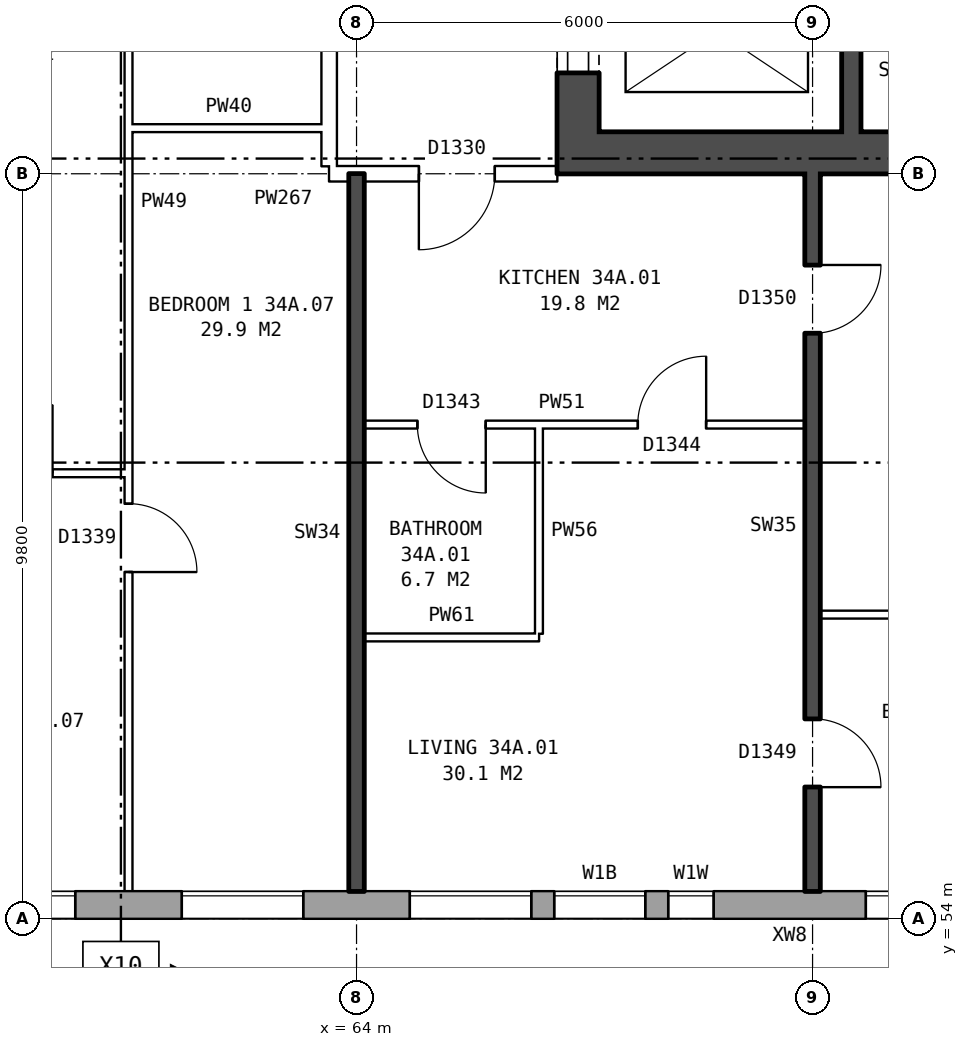
"""IFC4 building model, lengths in metres.
Left out: names, types, materials, properties, quantities, classifications, styles, units other than length and angle.
Written with IfcOpenShell. Run it as: python <this file> out.ifc"""

import sys

from ifc_helpers import new_model, si_unit, direction, frame, frame_2d, origin, place, context, subcontext, project, spatial, rectangle, extrude, element, fill, save


model = new_model("IFC4")
c1 = context("Model", 3, precision=1e-05, world=origin(), true_north=direction((0.0, 1.0)))
c2 = subcontext(c1, "Body", "Model", "MODEL_VIEW")
j1 = project(units=[si_unit("LENGTHUNIT", "METRE"), si_unit("PLANEANGLEUNIT", "RADIAN")], contexts=[c1])
p1 = place(None, origin())
s1 = spatial("IfcSite", under=j1, at=p1, CompositionType="ELEMENT")
p2 = place(p1, origin())
s2 = spatial("IfcBuilding", under=s1, at=p2, CompositionType="ELEMENT")
p3 = place(p2, frame((0.0, 0.0, 123.7)))
s3 = spatial("IfcBuildingStorey", under=s2, at=p3, CompositionType="ELEMENT", Elevation=123.7)
p4 = place(p3, frame((29.825, 54.18, 0.0), z_axis=(0.0, 0.0, 1.0), x_axis=(1.0, 0.0, 0.0)))
e1 = element("IfcWall", 1, at=p4, inside=s3, PredefinedType="STANDARD", context=c2, shape_type="SweptSolid", body=[
    extrude(rectangle(XDim=43.101, YDim=0.36, at=frame_2d((21.55, 0.0))), origin(), (0.0, 0.0, 1.0), 2.85),
])
p5 = place(p4, frame((0.3, 0.0, 0.8)))
e2 = element("IfcOpeningElement", 2, at=p5, cuts=e1, PredefinedType="OPENING", context=c2, shape_type="SweptSolid", body=[
    extrude(rectangle(XDim=1.6, YDim=1.8, at=frame_2d((0.8, 0.9))), frame((0.0, 0.19, 0.0), z_axis=(0.0, -1.0, 0.0), x_axis=(1.0, 0.0, 0.0)), (0.0, 0.0, 1.0), 0.38),
])
p6 = place(p4, frame((4.875, 0.0, 0.8)))
e3 = element("IfcOpeningElement", 3, at=p6, cuts=e1, PredefinedType="OPENING", context=c2, shape_type="SweptSolid", body=[
    extrude(rectangle(XDim=1.6, YDim=1.8, at=frame_2d((0.8, 0.9))), frame((0.0, 0.19, 0.0), z_axis=(0.0, -1.0, 0.0), x_axis=(1.0, 0.0, 0.0)), (0.0, 0.0, 1.0), 0.38),
])
p7 = place(p4, frame((7.875, 0.0, 0.8)))
e4 = element("IfcOpeningElement", 4, at=p7, cuts=e1, PredefinedType="OPENING", context=c2, shape_type="SweptSolid", body=[
    extrude(rectangle(XDim=1.6, YDim=1.8, at=frame_2d((0.8, 0.9))), frame((0.0, 0.19, 0.0), z_axis=(0.0, -1.0, 0.0), x_axis=(1.0, 0.0, 0.0)), (0.0, 0.0, 1.0), 0.38),
])
p8 = place(p4, frame((10.875, 0.0, 0.8)))
e5 = element("IfcOpeningElement", 5, at=p8, cuts=e1, PredefinedType="OPENING", context=c2, shape_type="SweptSolid", body=[
    extrude(rectangle(XDim=1.6, YDim=1.8, at=frame_2d((0.8, 0.9))), frame((0.0, 0.19, 0.0), z_axis=(0.0, -1.0, 0.0), x_axis=(1.0, 0.0, 0.0)), (0.0, 0.0, 1.0), 0.38),
])
p9 = place(p4, frame((13.875, 0.0, 0.8)))
e6 = element("IfcOpeningElement", 6, at=p9, cuts=e1, PredefinedType="OPENING", context=c2, shape_type="SweptSolid", body=[
    extrude(rectangle(XDim=1.6, YDim=1.8, at=frame_2d((0.8, 0.9))), frame((0.0, 0.19, 0.0), z_axis=(0.0, -1.0, 0.0), x_axis=(1.0, 0.0, 0.0)), (0.0, 0.0, 1.0), 0.38),
])
p10 = place(p4, frame((16.875, 0.0, 0.8)))
e7 = element("IfcOpeningElement", 7, at=p10, cuts=e1, PredefinedType="OPENING", context=c2, shape_type="SweptSolid", body=[
    extrude(rectangle(XDim=1.6, YDim=1.8, at=frame_2d((0.8, 0.9))), frame((0.0, 0.19, 0.0), z_axis=(0.0, -1.0, 0.0), x_axis=(1.0, 0.0, 0.0)), (0.0, 0.0, 1.0), 0.38),
])
p11 = place(p4, frame((19.875, 0.0, 0.8)))
e8 = element("IfcOpeningElement", 8, at=p11, cuts=e1, PredefinedType="OPENING", context=c2, shape_type="SweptSolid", body=[
    extrude(rectangle(XDim=1.6, YDim=1.8, at=frame_2d((0.8, 0.9))), frame((0.0, 0.19, 0.0), z_axis=(0.0, -1.0, 0.0), x_axis=(1.0, 0.0, 0.0)), (0.0, 0.0, 1.0), 0.38),
])
p12 = place(p4, frame((22.875, 0.0, 0.8)))
e9 = element("IfcOpeningElement", 9, at=p12, cuts=e1, PredefinedType="OPENING", context=c2, shape_type="SweptSolid", body=[
    extrude(rectangle(XDim=1.6, YDim=1.8, at=frame_2d((0.8, 0.9))), frame((0.0, 0.19, 0.0), z_axis=(0.0, -1.0, 0.0), x_axis=(1.0, 0.0, 0.0)), (0.0, 0.0, 1.0), 0.38),
])
p13 = place(p4, frame((25.875, 0.0, 0.8)))
e10 = element("IfcOpeningElement", 10, at=p13, cuts=e1, PredefinedType="OPENING", context=c2, shape_type="SweptSolid", body=[
    extrude(rectangle(XDim=1.6, YDim=1.8, at=frame_2d((0.8, 0.9))), frame((0.0, 0.19, 0.0), z_axis=(0.0, -1.0, 0.0), x_axis=(1.0, 0.0, 0.0)), (0.0, 0.0, 1.0), 0.38),
])
p14 = place(p4, frame((28.875, 0.0, 0.8)))
e11 = element("IfcOpeningElement", 11, at=p14, cuts=e1, PredefinedType="OPENING", context=c2, shape_type="SweptSolid", body=[
    extrude(rectangle(XDim=1.6, YDim=1.8, at=frame_2d((0.8, 0.9))), frame((0.0, 0.19, 0.0), z_axis=(0.0, -1.0, 0.0), x_axis=(1.0, 0.0, 0.0)), (0.0, 0.0, 1.0), 0.38),
])
p15 = place(p4, frame((31.875, 0.0, 0.8)))
e12 = element("IfcOpeningElement", 12, at=p15, cuts=e1, PredefinedType="OPENING", context=c2, shape_type="SweptSolid", body=[
    extrude(rectangle(XDim=1.6, YDim=1.8, at=frame_2d((0.8, 0.9))), frame((0.0, 0.19, 0.0), z_axis=(0.0, -1.0, 0.0), x_axis=(1.0, 0.0, 0.0)), (0.0, 0.0, 1.0), 0.38),
])
p16 = place(p4, frame((34.875, 0.0, 0.8)))
e13 = element("IfcOpeningElement", 13, at=p16, cuts=e1, PredefinedType="OPENING", context=c2, shape_type="SweptSolid", body=[
    extrude(rectangle(XDim=1.6, YDim=1.8, at=frame_2d((0.8, 0.9))), frame((0.0, 0.19, 0.0), z_axis=(0.0, -1.0, 0.0), x_axis=(1.0, 0.0, 0.0)), (0.0, 0.0, 1.0), 0.38),
])
p17 = place(p4, frame((36.775, 0.0, 0.8)))
e14 = element("IfcOpeningElement", 14, at=p17, cuts=e1, PredefinedType="OPENING", context=c2, shape_type="SweptSolid", body=[
    extrude(rectangle(XDim=1.2, YDim=1.8, at=frame_2d((0.6, 0.9))), frame((0.0, 0.19, 0.0), z_axis=(0.0, -1.0, 0.0), x_axis=(1.0, 0.0, 0.0)), (0.0, 0.0, 1.0), 0.38),
])
p18 = place(p4, frame((40.875, 0.0, 0.8)))
e15 = element("IfcOpeningElement", 15, at=p18, cuts=e1, PredefinedType="OPENING", context=c2, shape_type="SweptSolid", body=[
    extrude(rectangle(XDim=1.6, YDim=1.8, at=frame_2d((0.8, 0.9))), frame((0.0, 0.19, 0.0), z_axis=(0.0, -1.0, 0.0), x_axis=(1.0, 0.0, 0.0)), (0.0, 0.0, 1.0), 0.38),
])
p19 = place(p4, frame((2.2, 0.0, 1.7)))
e16 = element("IfcOpeningElement", 16, at=p19, cuts=e1, PredefinedType="OPENING", context=c2, shape_type="SweptSolid", body=[
    extrude(rectangle(XDim=0.8, YDim=0.9, at=frame_2d((0.4, 0.45))), frame((0.0, 0.19, 0.0), z_axis=(0.0, -1.0, 0.0), x_axis=(1.0, 0.0, 0.0)), (0.0, 0.0, 1.0), 0.38),
])
p20 = place(p4, frame((38.275, 0.0, 0.8)))
e17 = element("IfcOpeningElement", 17, at=p20, cuts=e1, PredefinedType="OPENING", context=c2, shape_type="SweptSolid", body=[
    extrude(rectangle(XDim=0.6, YDim=0.9, at=frame_2d((0.3, 0.45))), frame((0.0, 0.19, 0.0), z_axis=(0.0, -1.0, 0.0), x_axis=(1.0, 0.0, 0.0)), (0.0, 0.0, 1.0), 0.38),
])
p21 = place(p3, frame((66.915, 63.8, 0.0), z_axis=(0.0, 0.0, 1.0), x_axis=(0.0, 1.0, 0.0)))
e18 = element("IfcWall", 18, at=p21, inside=s3, PredefinedType="SHEAR", context=c2, shape_type="SweptSolid", body=[
    extrude(rectangle(XDim=12.4, YDim=0.55, at=frame_2d((6.2, 0.0))), origin(), (0.0, 0.0, 1.0), 2.85),
])
p22 = place(p21, frame((1.325, 0.0, 0.0)))
e19 = element("IfcOpeningElement", 19, at=p22, cuts=e18, PredefinedType="OPENING", context=c2, shape_type="SweptSolid", body=[
    extrude(rectangle(XDim=1.1, YDim=2.1, at=frame_2d((0.55, 1.05))), frame((0.0, 0.285, 0.0), z_axis=(0.0, -1.0, 0.0), x_axis=(1.0, 0.0, 0.0)), (0.0, 0.0, 1.0), 0.57),
])
p23 = place(p21, frame((3.6, 0.0, 0.0)))
e20 = element("IfcOpeningElement", 20, at=p23, cuts=e18, PredefinedType="OPENING", context=c2, shape_type="SweptSolid", body=[
    extrude(rectangle(XDim=1.1, YDim=2.1, at=frame_2d((0.55, 1.05))), frame((0.0, 0.285, 0.0), z_axis=(0.0, -1.0, 0.0), x_axis=(1.0, 0.0, 0.0)), (0.0, 0.0, 1.0), 0.57),
])
p24 = place(p21, frame((5.8, 0.0, 0.0)))
e21 = element("IfcOpeningElement", 21, at=p24, cuts=e18, PredefinedType="OPENING", context=c2, shape_type="SweptSolid", body=[
    extrude(rectangle(XDim=1.1, YDim=2.1, at=frame_2d((0.55, 1.05))), frame((0.0, 0.285, 0.0), z_axis=(0.0, -1.0, 0.0), x_axis=(1.0, 0.0, 0.0)), (0.0, 0.0, 1.0), 0.57),
])
p25 = place(p21, frame((8.0, 0.0, 0.0)))
e22 = element("IfcOpeningElement", 22, at=p25, cuts=e18, PredefinedType="OPENING", context=c2, shape_type="SweptSolid", body=[
    extrude(rectangle(XDim=1.1, YDim=2.1, at=frame_2d((0.55, 1.05))), frame((0.0, 0.285, 0.0), z_axis=(0.0, -1.0, 0.0), x_axis=(1.0, 0.0, 0.0)), (0.0, 0.0, 1.0), 0.57),
])
p26 = place(p21, frame((9.9, 0.0, 0.0)))
e23 = element("IfcOpeningElement", 23, at=p26, cuts=e18, PredefinedType="OPENING", context=c2, shape_type="SweptSolid", body=[
    extrude(rectangle(XDim=1.1, YDim=2.1, at=frame_2d((0.55, 1.05))), frame((0.0, 0.285, 0.0), z_axis=(0.0, -1.0, 0.0), x_axis=(1.0, 0.0, 0.0)), (0.0, 0.0, 1.0), 0.57),
])
p27 = place(p3, frame((67.19, 64.075, 0.0), z_axis=(0.0, 0.0, 1.0), x_axis=(1.0, 0.0, 0.0)))
e24 = element("IfcWall", 24, at=p27, inside=s3, PredefinedType="SHEAR", context=c2, shape_type="SweptSolid", body=[
    extrude(rectangle(XDim=7.9, YDim=0.55, at=frame_2d((3.95, 0.0))), origin(), (0.0, 0.0, 1.0), 2.85),
])
p28 = place(p3, frame((70.51, 64.35, 0.0), z_axis=(0.0, 0.0, 1.0), x_axis=(0.0, 1.0, 0.0)))
e25 = element("IfcWall", 25, at=p28, inside=s3, PredefinedType="SHEAR", context=c2, shape_type="SweptSolid", body=[
    extrude(rectangle(XDim=2.375, YDim=0.25, at=frame_2d((1.188, 0.0))), origin(), (0.0, 0.0, 1.0), 2.85),
])
p29 = place(p3, frame((63.64, 63.9, 0.0), z_axis=(0.0, 0.0, 1.0), x_axis=(0.0, 1.0, 0.0)))
e26 = element("IfcWall", 26, at=p29, inside=s3, PredefinedType="PARTITIONING", context=c2, shape_type="SweptSolid", body=[
    extrude(rectangle(XDim=12.2, YDim=0.2, at=frame_2d((6.1, 0.0))), origin(), (0.0, 0.0, 1.0), 2.85),
])
p30 = place(p29, frame((5.1, 0.0, 0.0)))
e27 = element("IfcOpeningElement", 27, at=p30, cuts=e26, PredefinedType="OPENING", context=c2, shape_type="SweptSolid", body=[
    extrude(rectangle(XDim=2.0, YDim=2.1, at=frame_2d((1.0, 1.05))), frame((0.0, 0.11, 0.0), z_axis=(0.0, -1.0, 0.0), x_axis=(1.0, 0.0, 0.0)), (0.0, 0.0, 1.0), 0.22),
])
p31 = place(p3, frame((64.1, 57.7, 0.0), z_axis=(0.0, 0.0, 1.0), x_axis=(1.0, 0.0, 0.0)))
e28 = element("IfcWall", 28, at=p31, inside=s3, PredefinedType="PARTITIONING", context=c2, shape_type="SweptSolid", body=[
    extrude(rectangle(XDim=2.3, YDim=0.1, at=frame_2d((1.15, 0.0))), origin(), (0.0, 0.0, 1.0), 2.85),
])
p32 = place(p3, frame((70.1, 58.0, 0.0), z_axis=(0.0, 0.0, 1.0), x_axis=(1.0, 0.0, 0.0)))
e29 = element("IfcWall", 29, at=p32, inside=s3, PredefinedType="PARTITIONING", context=c2, shape_type="SweptSolid", body=[
    extrude(rectangle(XDim=5.54, YDim=0.1, at=frame_2d((2.77, 0.0))), origin(), (0.0, 0.0, 1.0), 2.85),
])
p33 = place(p3, frame((58.1, 59.86, 0.0), z_axis=(0.0, 0.0, 1.0), x_axis=(1.0, 0.0, 0.0)))
e30 = element("IfcWall", 30, at=p33, inside=s3, PredefinedType="PARTITIONING", context=c2, shape_type="SweptSolid", body=[
    extrude(rectangle(XDim=2.9, YDim=0.1, at=frame_2d((1.45, 0.0))), origin(), (0.0, 0.0, 1.0), 2.85),
])
p34 = place(p33, frame((1.0, 0.0, 0.0)))
e31 = element("IfcOpeningElement", 31, at=p34, cuts=e30, PredefinedType="OPENING", context=c2, shape_type="SweptSolid", body=[
    extrude(rectangle(XDim=0.9, YDim=2.1, at=frame_2d((0.45, 1.05))), frame((0.0, 0.06, 0.0), z_axis=(0.0, -1.0, 0.0), x_axis=(1.0, 0.0, 0.0)), (0.0, 0.0, 1.0), 0.12),
])
p35 = place(p3, frame((64.1, 60.5, 0.0), z_axis=(0.0, 0.0, 1.0), x_axis=(1.0, 0.0, 0.0)))
e32 = element("IfcWall", 32, at=p35, inside=s3, PredefinedType="PARTITIONING", context=c2, shape_type="SweptSolid", body=[
    extrude(rectangle(XDim=5.8, YDim=0.1, at=frame_2d((2.9, 0.0))), origin(), (0.0, 0.0, 1.0), 2.85),
])
p36 = place(p35, frame((3.6, 0.0, 0.0)))
e33 = element("IfcOpeningElement", 33, at=p36, cuts=e32, PredefinedType="OPENING", context=c2, shape_type="SweptSolid", body=[
    extrude(rectangle(XDim=0.9, YDim=2.1, at=frame_2d((0.45, 1.05))), frame((0.0, 0.06, 0.0), z_axis=(0.0, -1.0, 0.0), x_axis=(1.0, 0.0, 0.0)), (0.0, 0.0, 1.0), 0.12),
])
p37 = place(p35, frame((0.7, 0.0, 0.0)))
e34 = element("IfcOpeningElement", 34, at=p37, cuts=e32, PredefinedType="OPENING", context=c2, shape_type="SweptSolid", body=[
    extrude(rectangle(XDim=0.9, YDim=2.1, at=frame_2d((0.45, 1.05))), frame((0.0, 0.06, 0.0), z_axis=(0.0, -1.0, 0.0), x_axis=(1.0, 0.0, 0.0)), (0.0, 0.0, 1.0), 0.12),
])
p38 = place(p3, frame((63.64, 63.8, 0.0), z_axis=(0.0, 0.0, 1.0), x_axis=(1.0, 0.0, 0.0)))
e35 = element("IfcWall", 35, at=p38, inside=s3, PredefinedType="PARTITIONING", context=c2, shape_type="SweptSolid", body=[
    extrude(rectangle(XDim=3.0, YDim=0.2, at=frame_2d((1.5, 0.0))), origin(), (0.0, 0.0, 1.0), 2.85),
])
p39 = place(p38, frame((1.18, 0.0, 0.0)))
e36 = element("IfcOpeningElement", 36, at=p39, cuts=e35, PredefinedType="OPENING", context=c2, shape_type="SweptSolid", body=[
    extrude(rectangle(XDim=1.0, YDim=2.1, at=frame_2d((0.5, 1.05))), frame((0.0, 0.11, 0.0), z_axis=(0.0, -1.0, 0.0), x_axis=(1.0, 0.0, 0.0)), (0.0, 0.0, 1.0), 0.22),
])
p40 = place(p3, frame((61.0, 64.4, 0.0), z_axis=(0.0, 0.0, 1.0), x_axis=(1.0, 0.0, 0.0)))
e37 = element("IfcWall", 37, at=p40, inside=s3, PredefinedType="PARTITIONING", context=c2, shape_type="SweptSolid", body=[
    extrude(rectangle(XDim=2.64, YDim=0.1, at=frame_2d((1.32, 0.0))), origin(), (0.0, 0.0, 1.0), 2.85),
])
p41 = place(p3, frame((61.0, 54.36, 0.0), z_axis=(0.0, 0.0, 1.0), x_axis=(0.0, 1.0, 0.0)))
e38 = element("IfcWall", 38, at=p41, inside=s3, PredefinedType="PARTITIONING", context=c2, shape_type="SweptSolid", body=[
    extrude(rectangle(XDim=14.34, YDim=0.1, at=frame_2d((7.17, 0.0))), origin(), (0.0, 0.0, 1.0), 2.85),
])
p42 = place(p41, frame((4.2, 0.0, 0.0)))
e39 = element("IfcOpeningElement", 39, at=p42, cuts=e38, PredefinedType="OPENING", context=c2, shape_type="SweptSolid", body=[
    extrude(rectangle(XDim=0.9, YDim=2.1, at=frame_2d((0.45, 1.05))), frame((0.0, 0.06, 0.0), z_axis=(0.0, -1.0, 0.0), x_axis=(1.0, 0.0, 0.0)), (0.0, 0.0, 1.0), 0.12),
])
p43 = place(p41, frame((13.04, 0.0, 0.0)))
e40 = element("IfcOpeningElement", 40, at=p43, cuts=e38, PredefinedType="OPENING", context=c2, shape_type="SweptSolid", body=[
    extrude(rectangle(XDim=0.9, YDim=2.1, at=frame_2d((0.45, 1.05))), frame((0.0, 0.06, 0.0), z_axis=(0.0, -1.0, 0.0), x_axis=(1.0, 0.0, 0.0)), (0.0, 0.0, 1.0), 0.12),
])
p44 = place(p3, frame((64.0, 54.36, 0.0), z_axis=(0.0, 0.0, 1.0), x_axis=(0.0, 1.0, 0.0)))
e41 = element("IfcWall", 41, at=p44, inside=s3, PredefinedType="SOLIDWALL", context=c2, shape_type="SweptSolid", body=[
    extrude(rectangle(XDim=9.44, YDim=0.2, at=frame_2d((4.72, 0.0))), origin(), (0.0, 0.0, 1.0), 2.85),
])
p45 = place(p3, frame((66.4, 57.75, 0.0), z_axis=(0.0, 0.0, 1.0), x_axis=(0.0, 1.0, 0.0)))
e42 = element("IfcWall", 42, at=p45, inside=s3, PredefinedType="PARTITIONING", context=c2, shape_type="SweptSolid", body=[
    extrude(rectangle(XDim=2.7, YDim=0.1, at=frame_2d((1.35, 0.0))), origin(), (0.0, 0.0, 1.0), 2.85),
])
p46 = place(p3, frame((70.0, 54.36, 0.0), z_axis=(0.0, 0.0, 1.0), x_axis=(0.0, 1.0, 0.0)))
e43 = element("IfcWall", 43, at=p46, inside=s3, PredefinedType="SOLIDWALL", context=c2, shape_type="SweptSolid", body=[
    extrude(rectangle(XDim=9.44, YDim=0.2, at=frame_2d((4.72, 0.0))), origin(), (0.0, 0.0, 1.0), 2.85),
])
p47 = place(p46, frame((1.37, 0.0, 0.0)))
e44 = element("IfcOpeningElement", 44, at=p47, cuts=e43, PredefinedType="OPENING", context=c2, shape_type="SweptSolid", body=[
    extrude(rectangle(XDim=0.9, YDim=2.1, at=frame_2d((0.45, 1.05))), frame((0.0, 0.11, 0.0), z_axis=(0.0, -1.0, 0.0), x_axis=(1.0, 0.0, 0.0)), (0.0, 0.0, 1.0), 0.22),
])
p48 = place(p46, frame((7.34, 0.0, 0.0)))
e45 = element("IfcOpeningElement", 45, at=p48, cuts=e43, PredefinedType="OPENING", context=c2, shape_type="SweptSolid", body=[
    extrude(rectangle(XDim=0.9, YDim=2.1, at=frame_2d((0.45, 1.05))), frame((0.0, 0.11, 0.0), z_axis=(0.0, -1.0, 0.0), x_axis=(1.0, 0.0, 0.0)), (0.0, 0.0, 1.0), 0.22),
])
p49 = place(p14, origin())
e46 = element("IfcWindow", 46, at=p49, inside=s3, PartitioningType="SINGLE_PANEL", PredefinedType="WINDOW", context=c2, shape_type="SweptSolid", body=[
    extrude(rectangle(XDim=1.6, YDim=1.8, at=frame_2d((0.8, 0.9))), frame((0.0, 0.15, 0.0), z_axis=(0.0, -1.0, 0.0), x_axis=(1.0, 0.0, 0.0)), (0.0, 0.0, 1.0), 0.06),
])
fill(e11, e46)
p50 = place(p15, origin())
e47 = element("IfcWindow", 47, at=p50, inside=s3, PartitioningType="SINGLE_PANEL", PredefinedType="WINDOW", context=c2, shape_type="SweptSolid", body=[
    extrude(rectangle(XDim=1.6, YDim=1.8, at=frame_2d((0.8, 0.9))), frame((0.0, 0.15, 0.0), z_axis=(0.0, -1.0, 0.0), x_axis=(1.0, 0.0, 0.0)), (0.0, 0.0, 1.0), 0.06),
])
fill(e12, e47)
p51 = place(p16, origin())
e48 = element("IfcWindow", 48, at=p51, inside=s3, PartitioningType="SINGLE_PANEL", PredefinedType="WINDOW", context=c2, shape_type="SweptSolid", body=[
    extrude(rectangle(XDim=1.6, YDim=1.8, at=frame_2d((0.8, 0.9))), frame((0.0, 0.15, 0.0), z_axis=(0.0, -1.0, 0.0), x_axis=(1.0, 0.0, 0.0)), (0.0, 0.0, 1.0), 0.06),
])
fill(e13, e48)
p52 = place(p17, origin())
e49 = element("IfcWindow", 49, at=p52, inside=s3, PartitioningType="SINGLE_PANEL", PredefinedType="WINDOW", context=c2, shape_type="SweptSolid", body=[
    extrude(rectangle(XDim=1.2, YDim=1.8, at=frame_2d((0.6, 0.9))), frame((0.0, 0.15, 0.0), z_axis=(0.0, -1.0, 0.0), x_axis=(1.0, 0.0, 0.0)), (0.0, 0.0, 1.0), 0.06),
])
fill(e14, e49)
p53 = place(p18, origin())
e50 = element("IfcWindow", 50, at=p53, inside=s3, PartitioningType="SINGLE_PANEL", PredefinedType="WINDOW", context=c2, shape_type="SweptSolid", body=[
    extrude(rectangle(XDim=1.6, YDim=1.8, at=frame_2d((0.8, 0.9))), frame((0.0, 0.15, 0.0), z_axis=(0.0, -1.0, 0.0), x_axis=(1.0, 0.0, 0.0)), (0.0, 0.0, 1.0), 0.06),
])
fill(e15, e50)
p54 = place(p22, origin())
e51 = element("IfcDoor", 51, at=p54, inside=s3, OperationType="DOUBLE_DOOR_SLIDING", PredefinedType="DOOR", context=c2, shape_type="SweptSolid", body=[
    extrude(rectangle(XDim=1.1, YDim=2.1, at=frame_2d((0.55, 1.05))), frame((0.0, -0.21, 0.0), z_axis=(0.0, -1.0, 0.0), x_axis=(1.0, 0.0, 0.0)), (0.0, 0.0, 1.0), 0.05),
])
fill(e19, e51)
p55 = place(p47, frame((0.9, 0.0, 0.0), z_axis=(0.0, 0.0, 1.0), x_axis=(-1.0, 0.0, 0.0)))
e52 = element("IfcDoor", 52, at=p55, inside=s3, OperationType="SINGLE_SWING_RIGHT", PredefinedType="DOOR", context=c2, shape_type="SweptSolid", body=[
    extrude(rectangle(XDim=0.9, YDim=2.1, at=frame_2d((0.45, 1.05))), frame((0.0, 0.025, 0.0), z_axis=(0.0, -1.0, 0.0), x_axis=(1.0, 0.0, 0.0)), (0.0, 0.0, 1.0), 0.05),
])
fill(e44, e52)
p56 = place(p48, frame((0.9, 0.0, 0.0), z_axis=(0.0, 0.0, 1.0), x_axis=(-1.0, 0.0, 0.0)))
e53 = element("IfcDoor", 53, at=p56, inside=s3, OperationType="SINGLE_SWING_LEFT", PredefinedType="DOOR", context=c2, shape_type="SweptSolid", body=[
    extrude(rectangle(XDim=0.9, YDim=2.1, at=frame_2d((0.45, 1.05))), frame((0.0, 0.025, 0.0), z_axis=(0.0, -1.0, 0.0), x_axis=(1.0, 0.0, 0.0)), (0.0, 0.0, 1.0), 0.05),
])
fill(e45, e53)
p57 = place(p39, frame((1.0, 0.0, 0.0), z_axis=(0.0, 0.0, 1.0), x_axis=(-1.0, 0.0, 0.0)))
e54 = element("IfcDoor", 54, at=p57, inside=s3, OperationType="SINGLE_SWING_RIGHT", PredefinedType="DOOR", context=c2, shape_type="SweptSolid", body=[
    extrude(rectangle(XDim=1.0, YDim=2.1, at=frame_2d((0.5, 1.05))), frame((0.0, 0.025, 0.0), z_axis=(0.0, -1.0, 0.0), x_axis=(1.0, 0.0, 0.0)), (0.0, 0.0, 1.0), 0.05),
])
fill(e36, e54)
p58 = place(p36, origin())
e55 = element("IfcDoor", 55, at=p58, inside=s3, OperationType="SINGLE_SWING_RIGHT", PredefinedType="DOOR", context=c2, shape_type="SweptSolid", body=[
    extrude(rectangle(XDim=0.9, YDim=2.1, at=frame_2d((0.45, 1.05))), frame((0.0, 0.025, 0.0), z_axis=(0.0, -1.0, 0.0), x_axis=(1.0, 0.0, 0.0)), (0.0, 0.0, 1.0), 0.05),
])
fill(e33, e55)
p59 = place(p37, frame((0.9, 0.0, 0.0), z_axis=(0.0, 0.0, 1.0), x_axis=(-1.0, 0.0, 0.0)))
e56 = element("IfcDoor", 56, at=p59, inside=s3, OperationType="SINGLE_SWING_LEFT", PredefinedType="DOOR", context=c2, shape_type="SweptSolid", body=[
    extrude(rectangle(XDim=0.9, YDim=2.1, at=frame_2d((0.45, 1.05))), frame((0.0, 0.025, 0.0), z_axis=(0.0, -1.0, 0.0), x_axis=(1.0, 0.0, 0.0)), (0.0, 0.0, 1.0), 0.05),
])
fill(e34, e56)
p60 = place(p42, frame((0.9, 0.0, 0.0), z_axis=(0.0, 0.0, 1.0), x_axis=(-1.0, 0.0, 0.0)))
e57 = element("IfcDoor", 57, at=p60, inside=s3, OperationType="SINGLE_SWING_RIGHT", PredefinedType="DOOR", context=c2, shape_type="SweptSolid", body=[
    extrude(rectangle(XDim=0.9, YDim=2.1, at=frame_2d((0.45, 1.05))), frame((0.0, 0.025, 0.0), z_axis=(0.0, -1.0, 0.0), x_axis=(1.0, 0.0, 0.0)), (0.0, 0.0, 1.0), 0.05),
])
fill(e39, e57)
p61 = place(p20, origin())
e58 = element("IfcWindow", 58, at=p61, inside=s3, PartitioningType="SINGLE_PANEL", PredefinedType="WINDOW", context=c2, shape_type="SweptSolid", body=[
    extrude(rectangle(XDim=0.6, YDim=0.9, at=frame_2d((0.3, 0.45))), frame((0.0, 0.15, 0.0), z_axis=(0.0, -1.0, 0.0), x_axis=(1.0, 0.0, 0.0)), (0.0, 0.0, 1.0), 0.06),
])
fill(e17, e58)
save(model, sys.argv[1])
